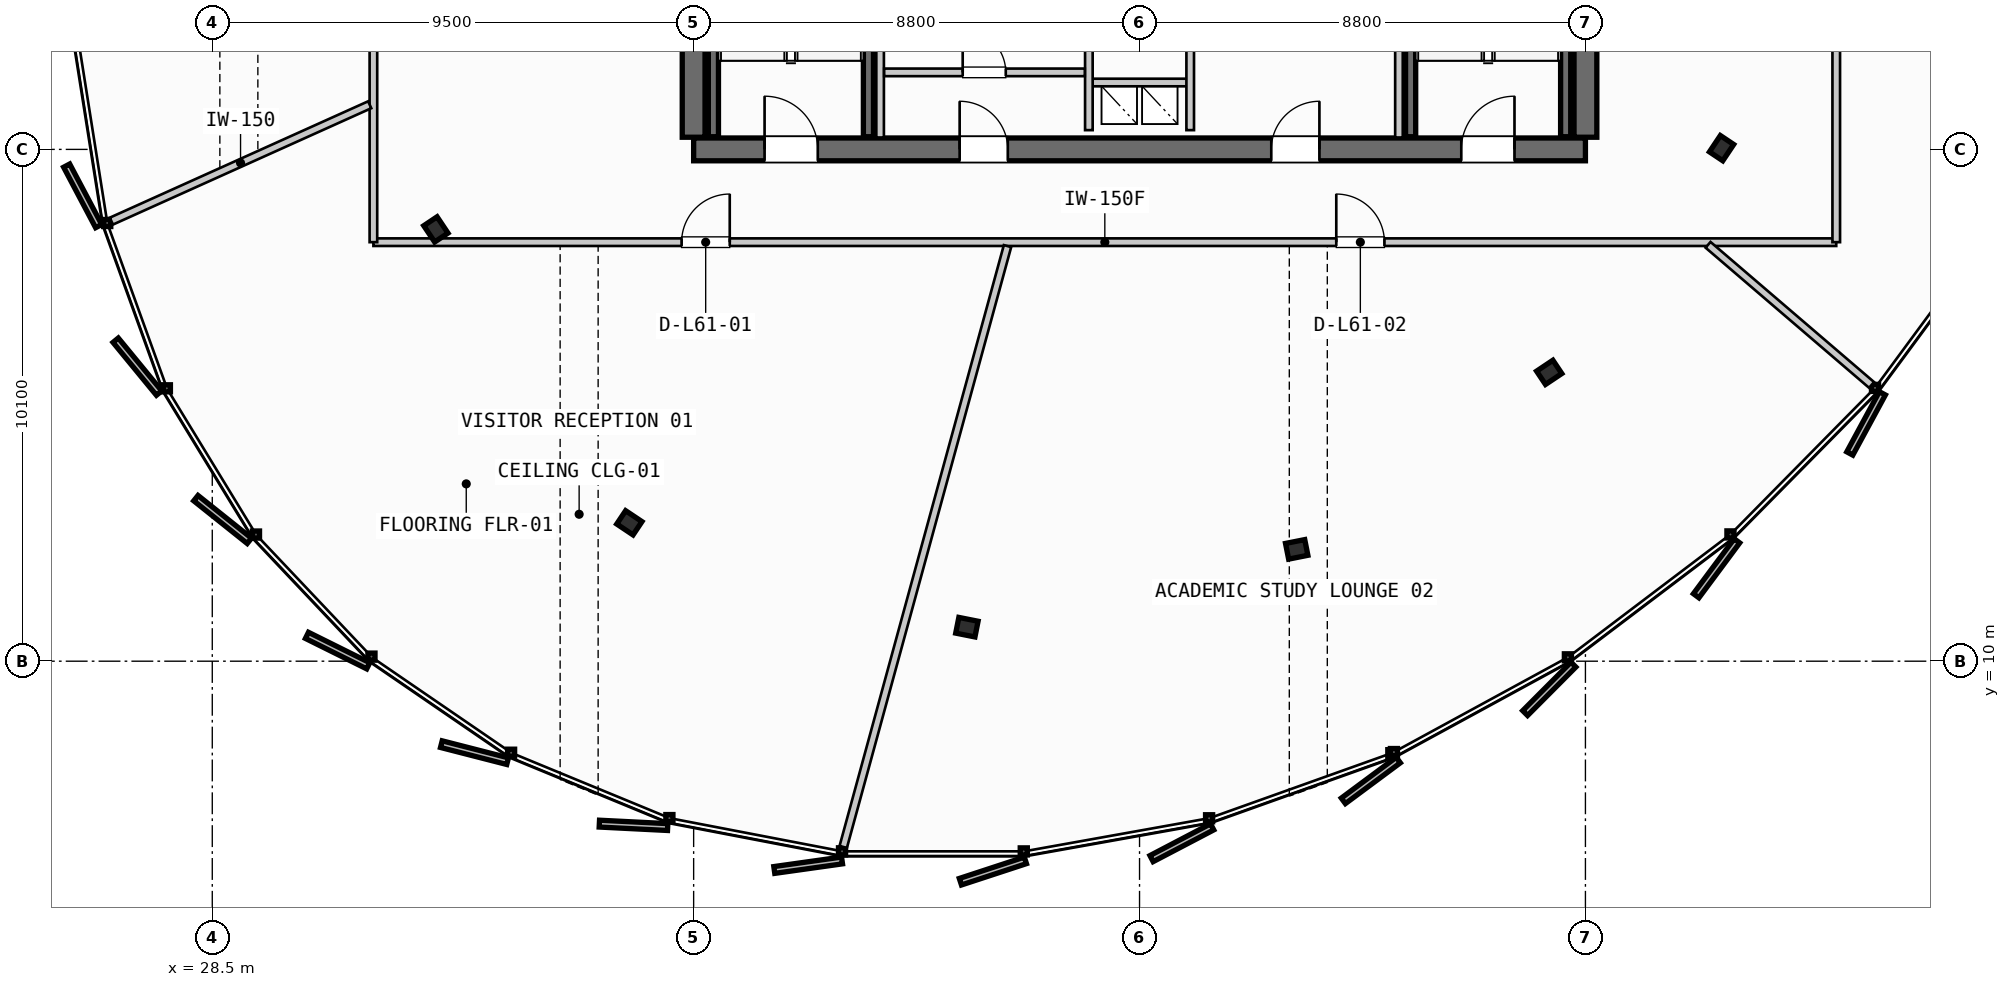
"""IFC4 building model, lengths in metres.
Left out: names, types, materials, properties, quantities, classifications, styles, units other than length and angle.
Written with IfcOpenShell. Run it as: python <this file> out.ifc"""

import sys

from ifc_helpers import new_model, si_unit, direction, frame, frame_2d, origin, origin_2d, place, context, subcontext, project, spatial, rectangle, i_section, extrude, source, transform, mapped, element, fill, save


model = new_model("IFC4")
c1 = context("Model", 3, precision=1e-05, world=origin(), true_north=direction((0.0, 1.0)))
c2 = subcontext(c1, "Body", "Model", "MODEL_VIEW")
j1 = project(units=[si_unit("LENGTHUNIT", "METRE"), si_unit("PLANEANGLEUNIT", "RADIAN")], contexts=[c1])
p1 = place(None, origin())
s1 = spatial("IfcSite", under=j1, at=p1, CompositionType="ELEMENT")
p2 = place(p1, origin())
s2 = spatial("IfcBuilding", under=s1, at=p2, CompositionType="ELEMENT")
p3 = place(p2, frame((0.0, 0.0, 235.3)))
s3 = spatial("IfcBuildingStorey", under=s2, at=p3, CompositionType="ELEMENT", Elevation=235.3)
p4 = place(p3, frame((38.0, 20.1, 0.0), z_axis=(0.0, 0.0, 1.0), x_axis=(1.0, 0.0, 0.0)))
e1 = element("IfcWall", 1, at=p4, inside=s3, PredefinedType="SHEAR", context=c2, shape_type="SweptSolid", body=[
    extrude(rectangle(XDim=17.6, YDim=0.45, at=frame_2d((8.8, 0.0))), origin(), (0.0, 0.0, 1.0), 3.21),
])
p5 = place(p4, frame((1.4, 0.0, 0.0)))
e2 = element("IfcOpeningElement", 2, at=p5, cuts=e1, PredefinedType="OPENING", context=c2, shape_type="SweptSolid", body=[
    extrude(rectangle(XDim=1.05, YDim=2.15, at=frame_2d((0.525, 1.075))), frame((0.0, 0.235, 0.0), z_axis=(0.0, -1.0, 0.0), x_axis=(1.0, 0.0, 0.0)), (0.0, 0.0, 1.0), 0.47),
])
p6 = place(p4, frame((15.15, 0.0, 0.0)))
e3 = element("IfcOpeningElement", 3, at=p6, cuts=e1, PredefinedType="OPENING", context=c2, shape_type="SweptSolid", body=[
    extrude(rectangle(XDim=1.05, YDim=2.15, at=frame_2d((0.525, 1.075))), frame((0.0, 0.235, 0.0), z_axis=(0.0, -1.0, 0.0), x_axis=(1.0, 0.0, 0.0)), (0.0, 0.0, 1.0), 0.47),
])
p7 = place(p4, frame((5.25, 0.0, 0.0)))
e4 = element("IfcOpeningElement", 4, at=p7, cuts=e1, PredefinedType="OPENING", context=c2, shape_type="SweptSolid", body=[
    extrude(rectangle(XDim=0.95, YDim=2.15, at=frame_2d((0.475, 1.075))), frame((0.0, 0.235, 0.0), z_axis=(0.0, -1.0, 0.0), x_axis=(1.0, 0.0, 0.0)), (0.0, 0.0, 1.0), 0.47),
])
p8 = place(p4, frame((11.4, 0.0, 0.0)))
e5 = element("IfcOpeningElement", 5, at=p8, cuts=e1, PredefinedType="OPENING", context=c2, shape_type="SweptSolid", body=[
    extrude(rectangle(XDim=0.95, YDim=2.15, at=frame_2d((0.475, 1.075))), frame((0.0, 0.235, 0.0), z_axis=(0.0, -1.0, 0.0), x_axis=(1.0, 0.0, 0.0)), (0.0, 0.0, 1.0), 0.47),
])
p9 = place(p3, frame((38.0, 35.26, 0.0), z_axis=(0.0, 0.0, 1.0), x_axis=(0.0, -1.0, 0.0)))
e6 = element("IfcWall", 6, at=p9, inside=s3, PredefinedType="SHEAR", context=c2, shape_type="SweptSolid", body=[
    extrude(rectangle(XDim=14.92, YDim=0.45, at=frame_2d((7.46, 0.0))), origin(), (0.0, 0.0, 1.0), 3.21),
])
p10 = place(p9, frame((5.21, 0.0, 0.0)))
e7 = element("IfcOpeningElement", 7, at=p10, cuts=e6, PredefinedType="OPENING", context=c2, shape_type="SweptSolid", body=[
    extrude(rectangle(XDim=1.1, YDim=2.2, at=frame_2d((0.55, 1.1))), frame((0.0, 0.235, 0.0), z_axis=(0.0, -1.0, 0.0), x_axis=(1.0, 0.0, 0.0)), (0.0, 0.0, 1.0), 0.47),
])
p11 = place(p3, frame((55.6, 20.34, 0.0), z_axis=(0.0, 0.0, 1.0), x_axis=(0.0, 1.0, 0.0)))
e8 = element("IfcWall", 8, at=p11, inside=s3, PredefinedType="SHEAR", context=c2, shape_type="SweptSolid", body=[
    extrude(rectangle(XDim=14.92, YDim=0.45, at=frame_2d((7.46, 0.0))), origin(), (0.0, 0.0, 1.0), 3.21),
])
p12 = place(p11, frame((12.71, 0.0, 0.0)))
e9 = element("IfcOpeningElement", 9, at=p12, cuts=e8, PredefinedType="OPENING", context=c2, shape_type="SweptSolid", body=[
    extrude(rectangle(XDim=1.05, YDim=2.15, at=frame_2d((0.525, 1.075))), frame((0.0, 0.235, 0.0), z_axis=(0.0, -1.0, 0.0), x_axis=(1.0, 0.0, 0.0)), (0.0, 0.0, 1.0), 0.47),
])
p13 = place(p11, frame((8.61, 0.0, 0.0)))
e10 = element("IfcOpeningElement", 10, at=p13, cuts=e8, PredefinedType="OPENING", context=c2, shape_type="SweptSolid", body=[
    extrude(rectangle(XDim=1.1, YDim=2.2, at=frame_2d((0.55, 1.1))), frame((0.0, 0.235, 0.0), z_axis=(0.0, -1.0, 0.0), x_axis=(1.0, 0.0, 0.0)), (0.0, 0.0, 1.0), 0.47),
])
m1 = source(origin(), c2, "Body", "SweptSolid", [
    extrude(i_section(OverallWidth=0.387, OverallDepth=0.316, WebThickness=0.019, FlangeThickness=0.028, FilletRadius=0.015, at=origin_2d()), origin(), (0.0, 0.0, 1.0), 3.21),
])
for number, where, z_axis, x_axis in (
    (11, (32.913, 18.521, 0.0), (0.0, 0.0, 1.0), (-0.831, -0.556, 0.0)),
    (12, (36.731, 12.731, 0.0), (0.0, 0.0, 1.0), (-0.556, -0.831, 0.0)),
    (13, (43.393, 10.671, 0.0), (0.0, 0.0, 1.0), (-0.195, -0.981, 0.0)),
    (14, (49.902, 12.207, 0.0), (0.0, 0.0, 1.0), (0.195, -0.981, 0.0)),
    (15, (54.885, 15.7, 0.0), (0.0, 0.0, 1.0), (0.556, -0.831, 0.0)),
    (16, (58.287, 20.125, 0.0), (0.0, 0.0, 1.0), (0.831, -0.556, 0.0)),
):
    element("IfcColumn", number, at=place(p3, frame(where, z_axis=z_axis, x_axis=x_axis)), inside=s3, PredefinedType="COLUMN", context=c2, shape_type="MappedRepresentation", body=[
        mapped(m1, transform((0.0, 0.0, 0.0), scale=1.0)),
    ])
for number, where, z_axis, x_axis in (
    (17, (41.45, 27.7, 0.0), (0.0, 0.0, 1.0), (0.0, -1.0, 0.0)),
    (18, (38.39, 20.35, 0.0), (0.0, 0.0, 1.0), (0.0, 1.0, 0.0)),
    (19, (55.21, 27.7, 0.0), (0.0, 0.0, 1.0), (0.0, -1.0, 0.0)),
    (20, (52.15, 20.35, 0.0), (0.0, 0.0, 1.0), (0.0, 1.0, 0.0)),
):
    element("IfcWall", number, at=place(p3, frame(where, z_axis=z_axis, x_axis=x_axis)), inside=s3, PredefinedType="SHEAR", context=c2, shape_type="SweptSolid", body=[
        extrude(rectangle(XDim=7.35, YDim=0.2, at=frame_2d((3.675, 0.0))), origin(), (0.0, 0.0, 1.0), 3.21),
    ])
p14 = place(p3, frame((45.8, 21.42, 0.0), z_axis=(0.0, 0.0, 1.0), x_axis=(1.0, 0.0, 0.0)))
e21 = element("IfcWall", 21, at=p14, inside=s3, PredefinedType="PARTITIONING", context=c2, shape_type="SweptSolid", body=[
    extrude(rectangle(XDim=2.0, YDim=0.15, at=frame_2d((1.0, 0.0))), origin(), (0.0, 0.0, 1.0), 2.28),
])
for number, where, z_axis, x_axis in (
    (22, (45.8, 20.48, 0.0), (0.0, 0.0, 1.0), (0.0, 1.0, 0.0)),
    (23, (47.8, 20.48, 0.0), (0.0, 0.0, 1.0), (0.0, 1.0, 0.0)),
):
    element("IfcWall", number, at=place(p3, frame(where, z_axis=z_axis, x_axis=x_axis)), inside=s3, PredefinedType="PARTITIONING", context=c2, shape_type="SweptSolid", body=[
        extrude(rectangle(XDim=2.24, YDim=0.15, at=frame_2d((1.12, 0.0))), origin(), (0.0, 0.0, 1.0), 2.28),
    ])
for number, where, z_axis, x_axis in (
    (24, (41.68, 20.335, 0.0), (0.0, 0.0, 1.0), (0.0, 1.0, 0.0)),
    (25, (51.92, 20.335, 0.0), (0.0, 0.0, 1.0), (0.0, 1.0, 0.0)),
):
    element("IfcWall", number, at=place(p3, frame(where, z_axis=z_axis, x_axis=x_axis)), inside=s3, PredefinedType="PARTITIONING", context=c2, shape_type="SweptSolid", body=[
        extrude(rectangle(XDim=2.395, YDim=0.15, at=frame_2d((1.198, 0.0))), origin(), (0.0, 0.0, 1.0), 2.28),
    ])
p15 = place(p3, frame((41.76, 21.62, 0.0), z_axis=(0.0, 0.0, 1.0), x_axis=(1.0, 0.0, 0.0)))
e26 = element("IfcWall", 26, at=p15, inside=s3, PredefinedType="PARTITIONING", context=c2, shape_type="SweptSolid", body=[
    extrude(rectangle(XDim=3.96, YDim=0.15, at=frame_2d((1.98, 0.0))), origin(), (0.0, 0.0, 1.0), 2.28),
])
p16 = place(p15, frame((1.55, 0.0, 0.0)))
e27 = element("IfcOpeningElement", 27, at=p16, cuts=e26, PredefinedType="OPENING", context=c2, shape_type="SweptSolid", body=[
    extrude(rectangle(XDim=0.85, YDim=2.15, at=frame_2d((0.425, 1.075))), frame((0.0, 0.085, 0.0), z_axis=(0.0, -1.0, 0.0), x_axis=(1.0, 0.0, 0.0)), (0.0, 0.0, 1.0), 0.17),
])
p17 = place(p3, frame((31.68, 18.269, 0.0), z_axis=(0.0, 0.0, 1.0), x_axis=(1.0, 0.0, 0.0)))
e28 = element("IfcWall", 28, at=p17, inside=s3, PredefinedType="PARTITIONING", context=c2, shape_type="SweptSolid", body=[
    extrude(rectangle(XDim=28.87, YDim=0.15, at=frame_2d((14.435, 0.0))), origin(), (0.0, 0.0, 1.0), 2.28),
])
p18 = place(p17, frame((6.083, 0.0, 0.0)))
e29 = element("IfcOpeningElement", 29, at=p18, cuts=e28, PredefinedType="OPENING", context=c2, shape_type="SweptSolid", body=[
    extrude(rectangle(XDim=0.95, YDim=2.15, at=frame_2d((0.475, 1.075))), frame((0.0, 0.085, 0.0), z_axis=(0.0, -1.0, 0.0), x_axis=(1.0, 0.0, 0.0)), (0.0, 0.0, 1.0), 0.17),
])
p19 = place(p17, frame((19.003, 0.0, 0.0)))
e30 = element("IfcOpeningElement", 30, at=p19, cuts=e28, PredefinedType="OPENING", context=c2, shape_type="SweptSolid", body=[
    extrude(rectangle(XDim=0.95, YDim=2.15, at=frame_2d((0.475, 1.075))), frame((0.0, 0.085, 0.0), z_axis=(0.0, -1.0, 0.0), x_axis=(1.0, 0.0, 0.0)), (0.0, 0.0, 1.0), 0.17),
])
p20 = place(p3, frame((60.55, 18.269, 0.0), z_axis=(0.0, 0.0, 1.0), x_axis=(0.0, 1.0, 0.0)))
e31 = element("IfcWall", 31, at=p20, inside=s3, PredefinedType="PARTITIONING", context=c2, shape_type="SweptSolid", body=[
    extrude(rectangle(XDim=18.831, YDim=0.15, at=frame_2d((9.416, 0.0))), origin(), (0.0, 0.0, 1.0), 2.28),
])
p21 = place(p20, frame((8.372, 0.0, 0.0)))
e32 = element("IfcOpeningElement", 32, at=p21, cuts=e31, PredefinedType="OPENING", context=c2, shape_type="SweptSolid", body=[
    extrude(rectangle(XDim=0.95, YDim=2.15, at=frame_2d((0.475, 1.075))), frame((0.0, 0.085, 0.0), z_axis=(0.0, -1.0, 0.0), x_axis=(1.0, 0.0, 0.0)), (0.0, 0.0, 1.0), 0.17),
])
p22 = place(p3, frame((31.68, 37.1, 0.0), z_axis=(0.0, 0.0, 1.0), x_axis=(0.0, -1.0, 0.0)))
e33 = element("IfcWall", 33, at=p22, inside=s3, PredefinedType="PARTITIONING", context=c2, shape_type="SweptSolid", body=[
    extrude(rectangle(XDim=18.831, YDim=0.15, at=frame_2d((9.416, 0.0))), origin(), (0.0, 0.0, 1.0), 2.28),
])
p23 = place(p22, frame((8.132, 0.0, 0.0)))
e34 = element("IfcOpeningElement", 34, at=p23, cuts=e33, PredefinedType="OPENING", context=c2, shape_type="SweptSolid", body=[
    extrude(rectangle(XDim=0.95, YDim=2.15, at=frame_2d((0.475, 1.075))), frame((0.0, 0.085, 0.0), z_axis=(0.0, -1.0, 0.0), x_axis=(1.0, 0.0, 0.0)), (0.0, 0.0, 1.0), 0.17),
])
p24 = place(p3, frame((31.607, 20.981, 0.0), z_axis=(0.0, 0.0, 1.0), x_axis=(-0.911796467515, -0.410642425752, 0.0)))
e35 = element("IfcWall", 35, at=p24, inside=s3, PredefinedType="PARTITIONING", context=c2, shape_type="SweptSolid", body=[
    extrude(rectangle(XDim=5.592, YDim=0.15, at=frame_2d((2.796, 0.0))), origin(), (0.0, 0.0, 1.0), 2.28),
])
p25 = place(p3, frame((44.194, 18.192, 0.0), z_axis=(0.0, 0.0, 1.0), x_axis=(-0.263735796415, -0.964594956284, 0.0)))
e36 = element("IfcWall", 36, at=p25, inside=s3, PredefinedType="PARTITIONING", context=c2, shape_type="SweptSolid", body=[
    extrude(rectangle(XDim=12.292, YDim=0.15, at=frame_2d((6.146, 0.0))), origin(), (0.0, 0.0, 1.0), 2.28),
])
p26 = place(p3, frame((58.02, 18.217, 0.0), z_axis=(0.0, 0.0, 1.0), x_axis=(0.759390413893, -0.650635227518, 0.0)))
e37 = element("IfcWall", 37, at=p26, inside=s3, PredefinedType="PARTITIONING", context=c2, shape_type="SweptSolid", body=[
    extrude(rectangle(XDim=4.25, YDim=0.15, at=frame_2d((2.125, 0.0))), origin(), (0.0, 0.0, 1.0), 2.28),
])
m2 = source(origin(), c2, "Body", "SweptSolid", [
    extrude(rectangle(XDim=1.05, YDim=2.15, at=frame_2d((0.525, 1.075))), frame((0.0, 0.025, 0.0), z_axis=(0.0, -1.0, 0.0), x_axis=(1.0, 0.0, 0.0)), (0.0, 0.0, 1.0), 0.05),
])
p27 = place(p5, origin())
e38 = element("IfcDoor", 38, at=p27, inside=s3, OperationType="SINGLE_SWING_LEFT", PredefinedType="DOOR", context=c2, shape_type="MappedRepresentation", body=[
    mapped(m2, transform((0.0, 0.0, 0.0), scale=1.0)),
])
fill(e2, e38)
p28 = place(p6, origin())
e39 = element("IfcDoor", 39, at=p28, inside=s3, OperationType="SINGLE_SWING_RIGHT", PredefinedType="DOOR", context=c2, shape_type="MappedRepresentation", body=[
    mapped(m2, transform((0.0, 0.0, 0.0), scale=1.0)),
])
fill(e3, e39)
m3 = source(origin(), c2, "Body", "SweptSolid", [
    extrude(rectangle(XDim=0.95, YDim=2.15, at=frame_2d((0.475, 1.075))), frame((0.0, 0.025, 0.0), z_axis=(0.0, -1.0, 0.0), x_axis=(1.0, 0.0, 0.0)), (0.0, 0.0, 1.0), 0.05),
])
p29 = place(p7, origin())
e40 = element("IfcDoor", 40, at=p29, inside=s3, OperationType="SINGLE_SWING_LEFT", PredefinedType="DOOR", context=c2, shape_type="MappedRepresentation", body=[
    mapped(m3, transform((0.0, 0.0, 0.0), scale=1.0)),
])
fill(e4, e40)
p30 = place(p8, origin())
e41 = element("IfcDoor", 41, at=p30, inside=s3, OperationType="SINGLE_SWING_RIGHT", PredefinedType="DOOR", context=c2, shape_type="MappedRepresentation", body=[
    mapped(m3, transform((0.0, 0.0, 0.0), scale=1.0)),
])
fill(e5, e41)
m4 = source(origin(), c2, "Body", "SweptSolid", [
    extrude(rectangle(XDim=0.85, YDim=2.15, at=frame_2d((0.425, 1.075))), frame((0.0, 0.025, 0.0), z_axis=(0.0, -1.0, 0.0), x_axis=(1.0, 0.0, 0.0)), (0.0, 0.0, 1.0), 0.05),
])
p31 = place(p16, origin())
e42 = element("IfcDoor", 42, at=p31, inside=s3, OperationType="SINGLE_SWING_LEFT", PredefinedType="DOOR", context=c2, shape_type="MappedRepresentation", body=[
    mapped(m4, transform((0.0, 0.0, 0.0), scale=1.0)),
])
fill(e27, e42)
p32 = place(p18, origin())
e43 = element("IfcDoor", 43, at=p32, inside=s3, OperationType="SINGLE_SWING_RIGHT", PredefinedType="DOOR", context=c2, shape_type="MappedRepresentation", body=[
    mapped(m3, transform((0.0, 0.0, 0.0), scale=1.0)),
])
fill(e29, e43)
p33 = place(p19, origin())
e44 = element("IfcDoor", 44, at=p33, inside=s3, OperationType="SINGLE_SWING_LEFT", PredefinedType="DOOR", context=c2, shape_type="MappedRepresentation", body=[
    mapped(m3, transform((0.0, 0.0, 0.0), scale=1.0)),
])
fill(e30, e44)
save(model, sys.argv[1])
